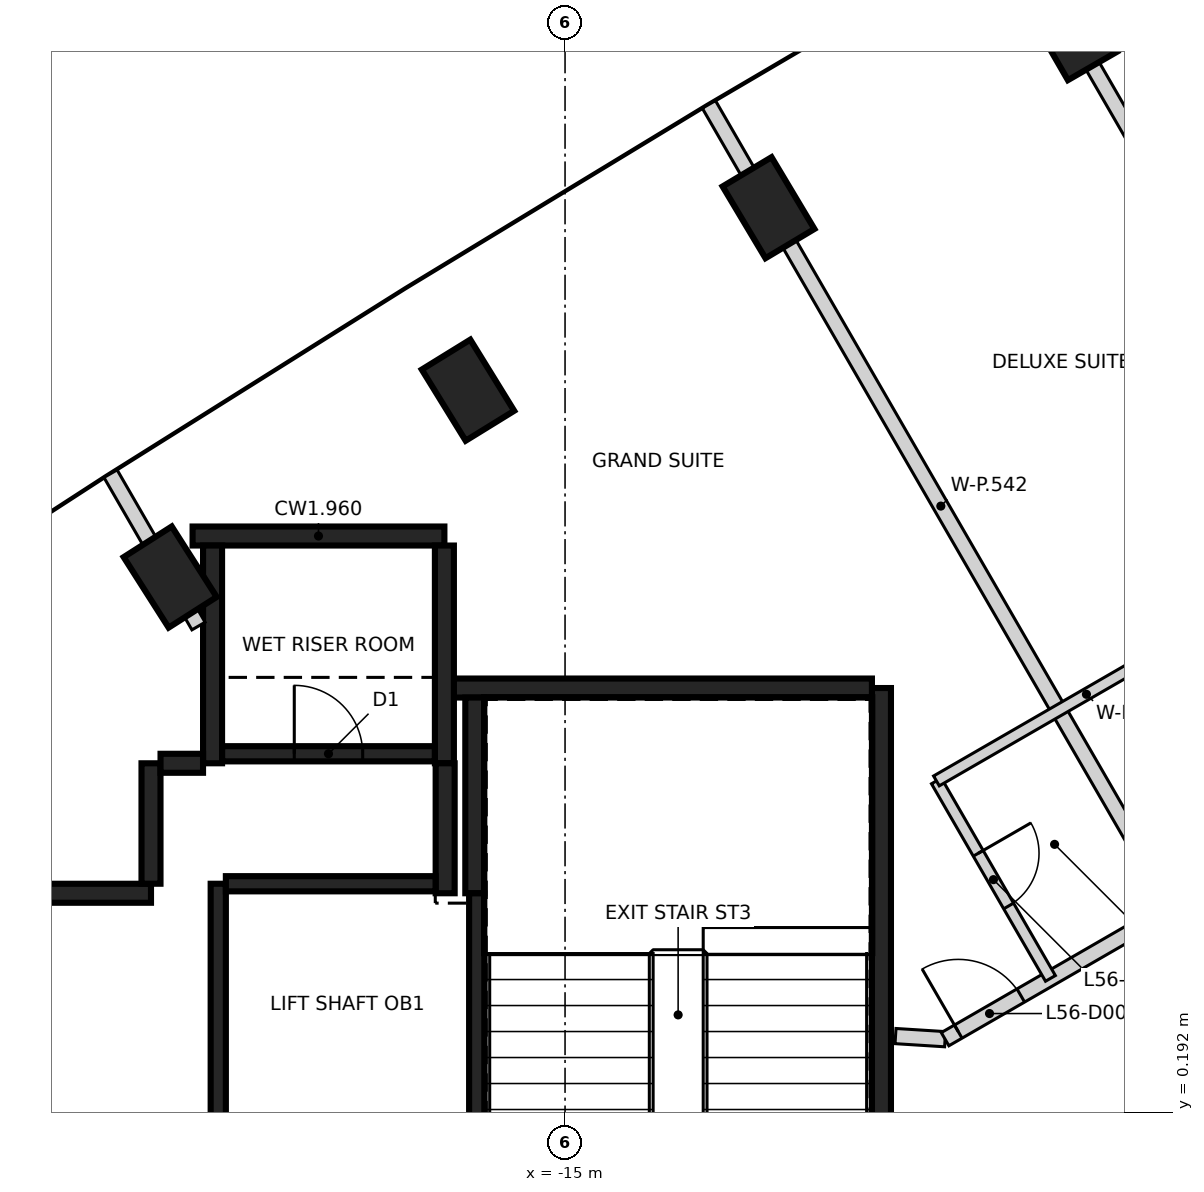
"""IFC4 building model, lengths in metres.
Left out: names, types, materials, properties, quantities, classifications, styles, units other than length and angle.
Written with IfcOpenShell. Run it as: python <this file> out.ifc"""

import sys

from ifc_helpers import new_model, si_unit, direction, frame, frame_2d, origin, origin_2d, place, context, subcontext, project, spatial, rectangle, extrude, element, fill, save


model = new_model("IFC4")
c1 = context("Model", 3, precision=1e-05, world=origin(), true_north=direction((0.0, 1.0)))
c2 = subcontext(c1, "Body", "Model", "MODEL_VIEW")
j1 = project(units=[si_unit("LENGTHUNIT", "METRE"), si_unit("PLANEANGLEUNIT", "RADIAN")], contexts=[c1])
p1 = place(None, origin())
s1 = spatial("IfcSite", under=j1, at=p1, CompositionType="ELEMENT")
p2 = place(p1, origin())
s2 = spatial("IfcBuilding", under=s1, at=p2, CompositionType="ELEMENT")
p3 = place(p2, frame((0.0, 0.0, 225.0)))
s3 = spatial("IfcBuildingStorey", under=s2, at=p3, CompositionType="ELEMENT", Elevation=225.0)
for number, where, z_axis, x_axis in (
    (1, (-8.335, 14.436, -0.35), (0.0, 0.0, 1.0), (-0.5, 0.866, 0.0)),
    (2, (-12.323, 12.094, -0.35), (0.0, 0.0, 1.0), (-0.513, 0.858, 0.0)),
    (3, (-16.277, 9.693, -0.35), (0.0, 0.0, 1.0), (-0.525, 0.851, 0.0)),
    (4, (-20.195, 7.235, -0.35), (0.0, 0.0, 1.0), (-0.538, 0.843, 0.0)),
):
    element("IfcColumn", number, at=place(p3, frame(where, z_axis=z_axis, x_axis=x_axis)), inside=s3, PredefinedType="COLUMN", context=c2, shape_type="SweptSolid", body=[
        extrude(rectangle(XDim=1.1, YDim=0.75, at=origin_2d()), origin(), (0.0, 0.0, 1.0), 3.6),
    ])
p4 = place(p3, frame((-10.837, 5.775, 0.0), z_axis=(0.0, 0.0, 1.0), x_axis=(0.0, -1.0, 0.0)))
e5 = element("IfcWall", 5, at=p4, inside=s3, PredefinedType="SHEAR", context=c2, shape_type="SweptSolid", body=[
    extrude(rectangle(XDim=11.55, YDim=0.25, at=frame_2d((5.775, 0.0))), origin(), (0.0, 0.0, 1.0), 3.25),
])
p5 = place(p4, frame((10.025, 0.0, 0.0)))
e6 = element("IfcOpeningElement", 6, at=p5, cuts=e5, PredefinedType="OPENING", context=c2, shape_type="SweptSolid", body=[
    extrude(rectangle(XDim=1.2, YDim=2.1, at=frame_2d((0.6, 1.05))), frame((0.0, 0.135, 0.0), z_axis=(0.0, -1.0, 0.0), x_axis=(1.0, 0.0, 0.0)), (0.0, 0.0, 1.0), 0.27),
])
p6 = place(p4, frame((8.725, 0.0, 0.0)))
e7 = element("IfcOpeningElement", 7, at=p6, cuts=e5, PredefinedType="OPENING", context=c2, shape_type="SweptSolid", body=[
    extrude(rectangle(XDim=1.2, YDim=2.1, at=frame_2d((0.6, 1.05))), frame((0.0, 0.135, 0.0), z_axis=(0.0, -1.0, 0.0), x_axis=(1.0, 0.0, 0.0)), (0.0, 0.0, 1.0), 0.27),
])
p7 = place(p3, frame((-16.472, 5.775, 0.0), z_axis=(0.0, 0.0, 1.0), x_axis=(1.0, 0.0, 0.0)))
e8 = element("IfcWall", 8, at=p7, inside=s3, PredefinedType="SHEAR", context=c2, shape_type="SweptSolid", body=[
    extrude(rectangle(XDim=5.51, YDim=0.25, at=frame_2d((2.755, 0.0))), origin(), (0.0, 0.0, 1.0), 3.25),
])
p8 = place(p3, frame((-19.9, 7.775, 0.0), z_axis=(0.0, 0.0, 1.0), x_axis=(1.0, 0.0, 0.0)))
e9 = element("IfcWall", 9, at=p8, inside=s3, PredefinedType="SHEAR", context=c2, shape_type="SweptSolid", body=[
    extrude(rectangle(XDim=3.313, YDim=0.25, at=frame_2d((1.656, 0.0))), origin(), (0.0, 0.0, 1.0), 3.25),
])
for number, where, z_axis, x_axis in (
    (10, (-16.587, 7.65, 0.0), (0.0, 0.0, 1.0), (0.0, -1.0, 0.0)),
    (11, (-19.637, 4.785, 0.0), (0.0, 0.0, 1.0), (0.0, 1.0, 0.0)),
):
    element("IfcWall", number, at=place(p3, frame(where, z_axis=z_axis, x_axis=x_axis)), inside=s3, PredefinedType="SHEAR", context=c2, shape_type="SweptSolid", body=[
        extrude(rectangle(XDim=2.865, YDim=0.25, at=frame_2d((1.432, 0.0))), origin(), (0.0, 0.0, 1.0), 3.25),
    ])
p9 = place(p3, frame((-16.187, 3.075, 0.0), z_axis=(0.0, 0.0, 1.0), x_axis=(0.0, 1.0, 0.0)))
e12 = element("IfcWall", 12, at=p9, inside=s3, PredefinedType="SHEAR", context=c2, shape_type="SweptSolid", body=[
    extrude(rectangle(XDim=2.575, YDim=0.25, at=frame_2d((1.287, 0.0))), origin(), (0.0, 0.0, 1.0), 3.25),
])
p10 = place(p3, frame((-22.312, 3.075, 0.0), z_axis=(0.0, 0.0, 1.0), x_axis=(1.0, 0.0, 0.0)))
e13 = element("IfcWall", 13, at=p10, inside=s3, PredefinedType="SHEAR", context=c2, shape_type="SweptSolid", body=[
    extrude(rectangle(XDim=1.865, YDim=0.25, at=frame_2d((0.932, 0.0))), origin(), (0.0, 0.0, 1.0), 3.25),
])
p11 = place(p3, frame((-16.577, 4.785, 0.0), z_axis=(0.0, 0.0, 1.0), x_axis=(0.0, -1.0, 0.0)))
e14 = element("IfcWall", 14, at=p11, inside=s3, PredefinedType="SHEAR", context=c2, shape_type="SweptSolid", body=[
    extrude(rectangle(XDim=1.71, YDim=0.25, at=frame_2d((0.855, 0.0))), origin(), (0.0, 0.0, 1.0), 3.25),
])
p12 = place(p3, frame((-20.447, 3.2, 0.0), z_axis=(0.0, 0.0, 1.0), x_axis=(0.0, 1.0, 0.0)))
e15 = element("IfcWall", 15, at=p12, inside=s3, PredefinedType="SHEAR", context=c2, shape_type="SweptSolid", body=[
    extrude(rectangle(XDim=1.584, YDim=0.25, at=frame_2d((0.792, 0.0))), origin(), (0.0, 0.0, 1.0), 3.25),
])
p13 = place(p3, frame((-20.322, 4.785, 0.0), z_axis=(0.0, 0.0, 1.0), x_axis=(1.0, 0.0, 0.0)))
e16 = element("IfcWall", 16, at=p13, inside=s3, PredefinedType="SHEAR", context=c2, shape_type="SweptSolid", body=[
    extrude(rectangle(XDim=0.559, YDim=0.25, at=frame_2d((0.28, 0.0))), origin(), (0.0, 0.0, 1.0), 3.25),
])
p14 = place(p3, frame((-16.162, 3.074, 0.0), z_axis=(0.0, 0.0, 1.0), x_axis=(0.0, -1.0, 0.0)))
e17 = element("IfcWall", 17, at=p14, inside=s3, PredefinedType="SHEAR", context=c2, shape_type="SweptSolid", body=[
    extrude(rectangle(XDim=5.974, YDim=0.2, at=frame_2d((2.987, 0.0))), origin(), (0.0, 0.0, 1.0), 3.25),
])
p15 = place(p3, frame((-19.562, -2.9, 0.0), z_axis=(0.0, 0.0, 1.0), x_axis=(0.0, 1.0, 0.0)))
e18 = element("IfcWall", 18, at=p15, inside=s3, PredefinedType="SHEAR", context=c2, shape_type="SweptSolid", body=[
    extrude(rectangle(XDim=6.1, YDim=0.2, at=frame_2d((3.05, 0.0))), origin(), (0.0, 0.0, 1.0), 3.25),
])
p16 = place(p3, frame((-19.511, 4.91, 0.0), z_axis=(0.0, 0.0, 1.0), x_axis=(1.0, 0.0, 0.0)))
e19 = element("IfcWall", 19, at=p16, inside=s3, PredefinedType="SHEAR", context=c2, shape_type="SweptSolid", body=[
    extrude(rectangle(XDim=2.798, YDim=0.2, at=frame_2d((1.399, 0.0))), origin(), (0.0, 0.0, 1.0), 3.25),
])
p17 = place(p16, frame((0.949, 0.0, 0.0)))
e20 = element("IfcOpeningElement", 20, at=p17, cuts=e19, PredefinedType="OPENING", context=c2, shape_type="SweptSolid", body=[
    extrude(rectangle(XDim=0.9, YDim=2.1, at=frame_2d((0.45, 1.05))), frame((0.0, 0.11, 0.0), z_axis=(0.0, -1.0, 0.0), x_axis=(1.0, 0.0, 0.0)), (0.0, 0.0, 1.0), 0.22),
])
p18 = place(p3, frame((-19.462, 3.2, 0.0), z_axis=(0.0, 0.0, 1.0), x_axis=(1.0, 0.0, 0.0)))
e21 = element("IfcWall", 21, at=p18, inside=s3, PredefinedType="SHEAR", context=c2, shape_type="SweptSolid", body=[
    extrude(rectangle(XDim=2.759, YDim=0.2, at=frame_2d((1.379, 0.0))), origin(), (0.0, 0.0, 1.0), 3.25),
])
p19 = place(p3, frame((-10.652, 1.196, 0.0), z_axis=(0.0, 0.0, 1.0), x_axis=(0.998005794618, -0.063122372489, 0.0)))
e22 = element("IfcWall", 22, at=p19, inside=s3, PredefinedType="PARTITIONING", context=c2, shape_type="SweptSolid", body=[
    extrude(rectangle(XDim=0.654, YDim=0.2, at=frame_2d((0.327, 0.0))), origin(), (0.0, 0.0, 1.0), 3.25),
])
p20 = place(p3, frame((-10.0, 1.155, 0.0), z_axis=(0.0, 0.0, 1.0), x_axis=(0.866014095592, 0.500019585852, 0.0)))
e23 = element("IfcWall", 23, at=p20, inside=s3, PredefinedType="PARTITIONING", context=c2, shape_type="SweptSolid", body=[
    extrude(rectangle(XDim=12.708, YDim=0.2, at=frame_2d((6.354, 0.0))), origin(), (0.0, 0.0, 1.0), 3.25),
])
p21 = place(p20, frame((6.944, 0.0, 0.0)))
e24 = element("IfcOpeningElement", 24, at=p21, cuts=e23, PredefinedType="OPENING", context=c2, shape_type="SweptSolid", body=[
    extrude(rectangle(XDim=0.95, YDim=2.1, at=frame_2d((0.475, 1.05))), frame((0.0, 0.11, 0.0), z_axis=(0.0, -1.0, 0.0), x_axis=(1.0, 0.0, 0.0)), (0.0, 0.0, 1.0), 0.22),
])
p22 = place(p20, frame((0.2, 0.0, 0.0)))
e25 = element("IfcOpeningElement", 25, at=p22, cuts=e23, PredefinedType="OPENING", context=c2, shape_type="SweptSolid", body=[
    extrude(rectangle(XDim=0.95, YDim=2.1, at=frame_2d((0.475, 1.05))), frame((0.0, 0.11, 0.0), z_axis=(0.0, -1.0, 0.0), x_axis=(1.0, 0.0, 0.0)), (0.0, 0.0, 1.0), 0.22),
])
p23 = place(p3, frame((-20.979, 8.595, 0.0), z_axis=(0.0, 0.0, 1.0), x_axis=(0.499950711303, -0.866053858757, 0.0)))
e26 = element("IfcWall", 26, at=p23, inside=s3, PredefinedType="PARTITIONING", context=c2, shape_type="SweptSolid", body=[
    extrude(rectangle(XDim=2.315, YDim=0.2, at=frame_2d((1.157, 0.0))), origin(), (0.0, 0.0, 1.0), 3.25),
])
p24 = place(p3, frame((-13.107, 13.453, 0.0), z_axis=(0.0, 0.0, 1.0), x_axis=(0.500037611077, -0.86600368793, 0.0)))
e27 = element("IfcWall", 27, at=p24, inside=s3, PredefinedType="PARTITIONING", context=c2, shape_type="SweptSolid", body=[
    extrude(rectangle(XDim=12.204, YDim=0.2, at=frame_2d((6.102, 0.0))), origin(), (0.0, 0.0, 1.0), 3.25),
])
p25 = place(p3, frame((-9.119, 15.795, 0.0), z_axis=(0.0, 0.0, 1.0), x_axis=(0.50001601051, -0.866016159915, 0.0)))
e28 = element("IfcWall", 28, at=p25, inside=s3, PredefinedType="PARTITIONING", context=c2, shape_type="SweptSolid", body=[
    extrude(rectangle(XDim=12.238, YDim=0.2, at=frame_2d((6.119, 0.0))), origin(), (0.0, 0.0, 1.0), 3.25),
])
p26 = place(p3, frame((-10.114, 4.553, 0.0), z_axis=(0.0, 0.0, 1.0), x_axis=(0.50002537861, -0.866010750942, 0.0)))
e29 = element("IfcWall", 29, at=p26, inside=s3, PredefinedType="PARTITIONING", context=c2, shape_type="SweptSolid", body=[
    extrude(rectangle(XDim=3.0, YDim=0.15, at=frame_2d((1.5, 0.0))), origin(), (0.0, 0.0, 1.0), 3.25),
])
p27 = place(p26, frame((1.1, 0.0, 0.0)))
e30 = element("IfcOpeningElement", 30, at=p27, cuts=e29, PredefinedType="OPENING", context=c2, shape_type="SweptSolid", body=[
    extrude(rectangle(XDim=0.8, YDim=2.1, at=frame_2d((0.4, 1.05))), frame((0.0, 0.085, 0.0), z_axis=(0.0, -1.0, 0.0), x_axis=(1.0, 0.0, 0.0)), (0.0, 0.0, 1.0), 0.17),
])
p28 = place(p3, frame((-10.114, 4.553, 0.0), z_axis=(0.0, 0.0, 1.0), x_axis=(0.866002713795, 0.500039298155, 0.0)))
e31 = element("IfcWall", 31, at=p28, inside=s3, PredefinedType="PARTITIONING", context=c2, shape_type="SweptSolid", body=[
    extrude(rectangle(XDim=4.558, YDim=0.15, at=frame_2d((2.279, 0.0))), origin(), (0.0, 0.0, 1.0), 3.25),
])
p29 = place(p17, origin())
e32 = element("IfcDoor", 32, at=p29, inside=s3, OperationType="SINGLE_SWING_LEFT", PredefinedType="DOOR", context=c2, shape_type="SweptSolid", body=[
    extrude(rectangle(XDim=0.9, YDim=2.1, at=frame_2d((0.45, 1.05))), frame((0.0, 0.025, 0.0), z_axis=(0.0, -1.0, 0.0), x_axis=(1.0, 0.0, 0.0)), (0.0, 0.0, 1.0), 0.05),
])
fill(e20, e32)
p30 = place(p22, origin())
e33 = element("IfcDoor", 33, at=p30, inside=s3, OperationType="SINGLE_SWING_LEFT", PredefinedType="DOOR", context=c2, shape_type="SweptSolid", body=[
    extrude(rectangle(XDim=0.95, YDim=2.1, at=frame_2d((0.475, 1.05))), frame((0.0, 0.025, 0.0), z_axis=(0.0, -1.0, 0.0), x_axis=(1.0, 0.0, 0.0)), (0.0, 0.0, 1.0), 0.05),
])
fill(e25, e33)
p31 = place(p27, frame((0.8, 0.0, 0.0), z_axis=(0.0, 0.0, 1.0), x_axis=(-1.0, 0.0, 0.0)))
e34 = element("IfcDoor", 34, at=p31, inside=s3, OperationType="SINGLE_SWING_LEFT", PredefinedType="DOOR", context=c2, shape_type="SweptSolid", body=[
    extrude(rectangle(XDim=0.8, YDim=2.1, at=frame_2d((0.4, 1.05))), frame((0.0, 0.025, 0.0), z_axis=(0.0, -1.0, 0.0), x_axis=(1.0, 0.0, 0.0)), (0.0, 0.0, 1.0), 0.05),
])
fill(e30, e34)
save(model, sys.argv[1])
